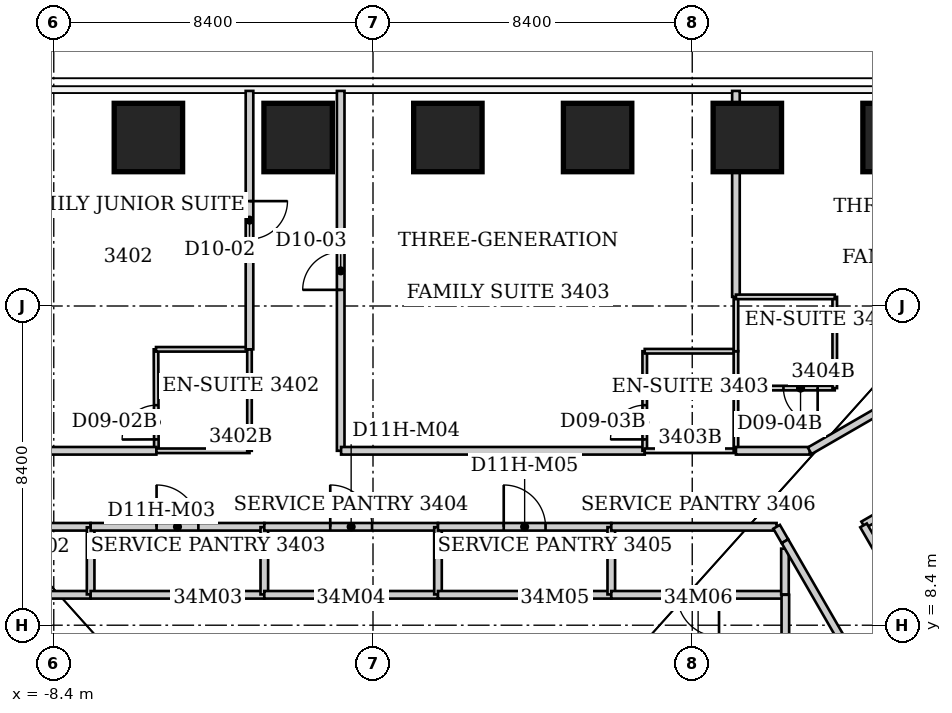
"""IFC4 building model, lengths in metres.
Left out: names, types, materials, properties, quantities, classifications, styles, units other than length and angle.
Written with IfcOpenShell. Run it as: python <this file> out.ifc"""

import sys

from ifc_helpers import new_model, si_unit, direction, frame, frame_2d, origin, origin_2d, place, context, subcontext, project, spatial, rectangle, extrude, element, fill, save


model = new_model("IFC4")
c1 = context("Model", 3, precision=1e-05, world=origin(), true_north=direction((0.0, 1.0)))
c2 = subcontext(c1, "Body", "Model", "MODEL_VIEW")
j1 = project(units=[si_unit("LENGTHUNIT", "METRE"), si_unit("PLANEANGLEUNIT", "RADIAN")], contexts=[c1])
p1 = place(None, origin())
s1 = spatial("IfcSite", under=j1, at=p1, CompositionType="ELEMENT")
p2 = place(p1, origin())
s2 = spatial("IfcBuilding", under=s1, at=p2, CompositionType="ELEMENT")
p3 = place(p2, frame((0.0, 0.0, 138.6)))
s3 = spatial("IfcBuildingStorey", under=s2, at=p3, CompositionType="ELEMENT", Elevation=138.6)
for number, where, z_axis, x_axis in (
    (1, (-5.91, 21.234, 0.0), (0.0, 0.0, 1.0), (0.0, 1.0, 0.0)),
    (2, (-1.97, 21.234, 0.0), (0.0, 0.0, 1.0), (0.0, 1.0, 0.0)),
    (3, (1.97, 21.234, 0.0), (0.0, 0.0, 1.0), (0.0, 1.0, 0.0)),
    (4, (5.91, 21.234, 0.0), (0.0, 0.0, 1.0), (0.0, 1.0, 0.0)),
    (5, (9.85, 21.234, 0.0), (0.0, 0.0, 1.0), (0.0, 1.0, 0.0)),
    (6, (13.79, 21.234, 0.0), (0.0, 0.0, 1.0), (0.0, 1.0, 0.0)),
):
    element("IfcColumn", number, at=place(p3, frame(where, z_axis=z_axis, x_axis=x_axis)), inside=s3, PredefinedType="COLUMN", context=c2, shape_type="SweptSolid", body=[
        extrude(rectangle(XDim=1.8, YDim=1.8, at=origin_2d()), origin(), (0.0, 0.0, 1.0), 3.8),
    ])
p4 = place(p3, frame((-11.99, 10.99, 0.0), z_axis=(0.0, 0.0, 1.0), x_axis=(1.0, 0.0, 0.0)))
e7 = element("IfcWall", 7, at=p4, inside=s3, PredefinedType="PARTITIONING", context=c2, shape_type="SweptSolid", body=[
    extrude(rectangle(XDim=4.56, YDim=0.2, at=frame_2d((2.28, 0.0))), origin(), (0.0, 0.0, 1.0), 3.64),
])
p5 = place(p3, frame((-7.43, 9.2, 0.0), z_axis=(0.0, 0.0, 1.0), x_axis=(-1.0, 0.0, 0.0)))
e8 = element("IfcWall", 8, at=p5, inside=s3, PredefinedType="PARTITIONING", context=c2, shape_type="SweptSolid", body=[
    extrude(rectangle(XDim=3.41, YDim=0.2, at=frame_2d((1.705, 0.0))), origin(), (0.0, 0.0, 1.0), 3.64),
])
p6 = place(p3, frame((-7.43, 10.975, 0.0), z_axis=(0.0, 0.0, 1.0), x_axis=(0.0, -1.0, 0.0)))
e9 = element("IfcWall", 9, at=p6, inside=s3, PredefinedType="PARTITIONING", context=c2, shape_type="SweptSolid", body=[
    extrude(rectangle(XDim=1.765, YDim=0.2, at=frame_2d((0.883, 0.0))), origin(), (0.0, 0.0, 1.0), 3.64),
])
p7 = place(p3, frame((-7.43, 10.99, 0.0), z_axis=(0.0, 0.0, 1.0), x_axis=(1.0, 0.0, 0.0)))
e10 = element("IfcWall", 10, at=p7, inside=s3, PredefinedType="PARTITIONING", context=c2, shape_type="SweptSolid", body=[
    extrude(rectangle(XDim=4.57, YDim=0.2, at=frame_2d((2.285, 0.0))), origin(), (0.0, 0.0, 1.0), 3.64),
])
p8 = place(p7, frame((1.735, 0.0, 0.0)))
e11 = element("IfcOpeningElement", 11, at=p8, cuts=e10, PredefinedType="OPENING", context=c2, shape_type="SweptSolid", body=[
    extrude(rectangle(XDim=1.1, YDim=2.2, at=frame_2d((0.55, 1.1))), frame((0.0, 0.1, 0.0), z_axis=(0.0, -1.0, 0.0), x_axis=(1.0, 0.0, 0.0)), (0.0, 0.0, 1.0), 0.2),
])
p9 = place(p3, frame((-5.71, 15.66, 0.0), z_axis=(0.0, 0.0, 1.0), x_axis=(0.003749059241, -0.999992972253, 0.0)))
e12 = element("IfcWall", 12, at=p9, inside=s3, PredefinedType="PARTITIONING", context=c2, shape_type="SweptSolid", body=[
    extrude(rectangle(XDim=2.67, YDim=0.12, at=frame_2d((1.335, 0.0))), origin(), (0.0, 0.0, 1.0), 3.64),
])
p10 = place(p9, frame((1.47, 0.0, 0.0)))
e13 = element("IfcOpeningElement", 13, at=p10, cuts=e12, PredefinedType="OPENING", context=c2, shape_type="SweptSolid", body=[
    extrude(rectangle(XDim=0.9, YDim=2.03, at=frame_2d((0.45, 1.015))), frame((0.0, 0.06, 0.0), z_axis=(0.0, -1.0, 0.0), x_axis=(1.0, 0.0, 0.0)), (0.0, 0.0, 1.0), 0.12),
])
p11 = place(p3, frame((-5.7, 12.99, 0.0), z_axis=(0.0, 0.0, 1.0), x_axis=(-1.0, 0.0, 0.0)))
e14 = element("IfcWall", 14, at=p11, inside=s3, PredefinedType="PARTITIONING", context=c2, shape_type="SweptSolid", body=[
    extrude(rectangle(XDim=3.92, YDim=0.2, at=frame_2d((1.96, 0.0))), origin(), (0.0, 0.0, 1.0), 3.64),
])
p12 = place(p3, frame((-3.25, 12.99, 0.0), z_axis=(0.0, 0.0, 1.0), x_axis=(-1.0, 0.0, 0.0)))
e15 = element("IfcWall", 15, at=p12, inside=s3, PredefinedType="PARTITIONING", context=c2, shape_type="SweptSolid", body=[
    extrude(rectangle(XDim=2.45, YDim=0.12, at=frame_2d((1.225, 0.0))), origin(), (0.0, 0.0, 1.0), 3.64),
])
p13 = place(p3, frame((-3.25, 15.66, 0.0), z_axis=(0.0, 0.0, 1.0), x_axis=(-1.0, 0.0, 0.0)))
e16 = element("IfcWall", 16, at=p13, inside=s3, PredefinedType="PARTITIONING", context=c2, shape_type="SweptSolid", body=[
    extrude(rectangle(XDim=2.46, YDim=0.12, at=frame_2d((1.23, 0.0))), origin(), (0.0, 0.0, 1.0), 3.64),
])
p14 = place(p3, frame((-3.25, 15.66, 0.0), z_axis=(0.0, 0.0, 1.0), x_axis=(0.0, -1.0, 0.0)))
e17 = element("IfcWall", 17, at=p14, inside=s3, PredefinedType="PARTITIONING", context=c2, shape_type="SweptSolid", body=[
    extrude(rectangle(XDim=2.67, YDim=0.12, at=frame_2d((1.335, 0.0))), origin(), (0.0, 0.0, 1.0), 3.64),
])
p15 = place(p3, frame((-3.25, 22.46, 0.0), z_axis=(0.0, 0.0, 1.0), x_axis=(0.0, -1.0, 0.0)))
e18 = element("IfcWall", 18, at=p15, inside=s3, PredefinedType="PARTITIONING", context=c2, shape_type="SweptSolid", body=[
    extrude(rectangle(XDim=6.8, YDim=0.2, at=frame_2d((3.4, 0.0))), origin(), (0.0, 0.0, 1.0), 3.64),
])
p16 = place(p15, frame((2.9, 0.0, 0.0)))
e19 = element("IfcOpeningElement", 19, at=p16, cuts=e18, PredefinedType="OPENING", context=c2, shape_type="SweptSolid", body=[
    extrude(rectangle(XDim=1.0, YDim=2.13, at=frame_2d((0.5, 1.065))), frame((0.0, 0.1, 0.0), z_axis=(0.0, -1.0, 0.0), x_axis=(1.0, 0.0, 0.0)), (0.0, 0.0, 1.0), 0.2),
])
p17 = place(p3, frame((-2.86, 9.2, 0.0), z_axis=(0.0, 0.0, 1.0), x_axis=(-1.0, 0.0, 0.0)))
e20 = element("IfcWall", 20, at=p17, inside=s3, PredefinedType="PARTITIONING", context=c2, shape_type="SweptSolid", body=[
    extrude(rectangle(XDim=4.57, YDim=0.2, at=frame_2d((2.285, 0.0))), origin(), (0.0, 0.0, 1.0), 3.64),
])
p18 = place(p3, frame((-2.86, 10.98, 0.0), z_axis=(0.0, 0.0, 1.0), x_axis=(0.0, -1.0, 0.0)))
e21 = element("IfcWall", 21, at=p18, inside=s3, PredefinedType="PARTITIONING", context=c2, shape_type="SweptSolid", body=[
    extrude(rectangle(XDim=1.77, YDim=0.2, at=frame_2d((0.885, 0.0))), origin(), (0.0, 0.0, 1.0), 3.64),
])
p19 = place(p3, frame((-2.86, 10.99, 0.0), z_axis=(0.0, 0.0, 1.0), x_axis=(1.0, 0.0, 0.0)))
e22 = element("IfcWall", 22, at=p19, inside=s3, PredefinedType="PARTITIONING", context=c2, shape_type="SweptSolid", body=[
    extrude(rectangle(XDim=4.57, YDim=0.2, at=frame_2d((2.285, 0.0))), origin(), (0.0, 0.0, 1.0), 3.64),
])
p20 = place(p19, frame((1.735, 0.0, 0.0)))
e23 = element("IfcOpeningElement", 23, at=p20, cuts=e22, PredefinedType="OPENING", context=c2, shape_type="SweptSolid", body=[
    extrude(rectangle(XDim=1.1, YDim=2.2, at=frame_2d((0.55, 1.1))), frame((0.0, 0.1, 0.0), z_axis=(0.0, -1.0, 0.0), x_axis=(1.0, 0.0, 0.0)), (0.0, 0.0, 1.0), 0.2),
])
p21 = place(p3, frame((-0.85, 12.99, 0.0), z_axis=(0.0, 0.0, 1.0), x_axis=(0.0, 1.0, 0.0)))
e24 = element("IfcWall", 24, at=p21, inside=s3, PredefinedType="PARTITIONING", context=c2, shape_type="SweptSolid", body=[
    extrude(rectangle(XDim=9.47, YDim=0.2, at=frame_2d((4.735, 0.0))), origin(), (0.0, 0.0, 1.0), 3.64),
])
p22 = place(p21, frame((4.235, 0.0, 0.0)))
e25 = element("IfcOpeningElement", 25, at=p22, cuts=e24, PredefinedType="OPENING", context=c2, shape_type="SweptSolid", body=[
    extrude(rectangle(XDim=1.0, YDim=2.13, at=frame_2d((0.5, 1.065))), frame((0.0, 0.1, 0.0), z_axis=(0.0, -1.0, 0.0), x_axis=(1.0, 0.0, 0.0)), (0.0, 0.0, 1.0), 0.2),
])
p23 = place(p3, frame((1.71, 9.2, 0.0), z_axis=(0.0, 0.0, 1.0), x_axis=(-1.0, 0.0, 0.0)))
e26 = element("IfcWall", 26, at=p23, inside=s3, PredefinedType="PARTITIONING", context=c2, shape_type="SweptSolid", body=[
    extrude(rectangle(XDim=4.57, YDim=0.2, at=frame_2d((2.285, 0.0))), origin(), (0.0, 0.0, 1.0), 3.64),
])
p24 = place(p3, frame((1.71, 10.98, 0.0), z_axis=(0.0, 0.0, 1.0), x_axis=(0.0, -1.0, 0.0)))
e27 = element("IfcWall", 27, at=p24, inside=s3, PredefinedType="PARTITIONING", context=c2, shape_type="SweptSolid", body=[
    extrude(rectangle(XDim=1.77, YDim=0.2, at=frame_2d((0.885, 0.0))), origin(), (0.0, 0.0, 1.0), 3.64),
])
p25 = place(p3, frame((1.71, 10.99, 0.0), z_axis=(0.0, 0.0, 1.0), x_axis=(1.0, 0.0, 0.0)))
e28 = element("IfcWall", 28, at=p25, inside=s3, PredefinedType="PARTITIONING", context=c2, shape_type="SweptSolid", body=[
    extrude(rectangle(XDim=4.56, YDim=0.2, at=frame_2d((2.28, 0.0))), origin(), (0.0, 0.0, 1.0), 3.64),
])
p26 = place(p25, frame((1.73, 0.0, 0.0)))
e29 = element("IfcOpeningElement", 29, at=p26, cuts=e28, PredefinedType="OPENING", context=c2, shape_type="SweptSolid", body=[
    extrude(rectangle(XDim=1.1, YDim=2.2, at=frame_2d((0.55, 1.1))), frame((0.0, 0.1, 0.0), z_axis=(0.0, -1.0, 0.0), x_axis=(1.0, 0.0, 0.0)), (0.0, 0.0, 1.0), 0.2),
])
p27 = place(p3, frame((6.27, 9.2, 0.0), z_axis=(0.0, 0.0, 1.0), x_axis=(-1.0, 0.0, 0.0)))
e30 = element("IfcWall", 30, at=p27, inside=s3, PredefinedType="PARTITIONING", context=c2, shape_type="SweptSolid", body=[
    extrude(rectangle(XDim=4.56, YDim=0.2, at=frame_2d((2.28, 0.0))), origin(), (0.0, 0.0, 1.0), 3.64),
])
p28 = place(p3, frame((6.27, 10.98, 0.0), z_axis=(0.0, 0.0, 1.0), x_axis=(0.0, -1.0, 0.0)))
e31 = element("IfcWall", 31, at=p28, inside=s3, PredefinedType="PARTITIONING", context=c2, shape_type="SweptSolid", body=[
    extrude(rectangle(XDim=1.77, YDim=0.2, at=frame_2d((0.885, 0.0))), origin(), (0.0, 0.0, 1.0), 3.64),
])
p29 = place(p3, frame((6.27, 10.99, 0.0), z_axis=(0.0, 0.0, 1.0), x_axis=(1.0, 0.0, 0.0)))
e32 = element("IfcWall", 32, at=p29, inside=s3, PredefinedType="PARTITIONING", context=c2, shape_type="SweptSolid", body=[
    extrude(rectangle(XDim=4.35, YDim=0.2, at=frame_2d((2.175, 0.0))), origin(), (0.0, 0.0, 1.0), 3.64),
])
p30 = place(p3, frame((7.15, 12.99, 0.0), z_axis=(0.0, 0.0, 1.0), x_axis=(-1.0, 0.0, 0.0)))
e33 = element("IfcWall", 33, at=p30, inside=s3, PredefinedType="PARTITIONING", context=c2, shape_type="SweptSolid", body=[
    extrude(rectangle(XDim=7.99, YDim=0.2, at=frame_2d((3.995, 0.0))), origin(), (0.0, 0.0, 1.0), 3.64),
])
p31 = place(p3, frame((7.15, 15.61, 0.0), z_axis=(0.0, 0.0, 1.0), x_axis=(0.0, -1.0, 0.0)))
e34 = element("IfcWall", 34, at=p31, inside=s3, PredefinedType="PARTITIONING", context=c2, shape_type="SweptSolid", body=[
    extrude(rectangle(XDim=2.62, YDim=0.12, at=frame_2d((1.31, 0.0))), origin(), (0.0, 0.0, 1.0), 3.64),
])
p32 = place(p31, frame((1.42, 0.0, 0.0)))
e35 = element("IfcOpeningElement", 35, at=p32, cuts=e34, PredefinedType="OPENING", context=c2, shape_type="SweptSolid", body=[
    extrude(rectangle(XDim=0.9, YDim=2.03, at=frame_2d((0.45, 1.015))), frame((0.0, 0.06, 0.0), z_axis=(0.0, -1.0, 0.0), x_axis=(1.0, 0.0, 0.0)), (0.0, 0.0, 1.0), 0.12),
])
p33 = place(p3, frame((9.55, 12.99, 0.0), z_axis=(0.0, 0.0, 1.0), x_axis=(-1.0, 0.0, 0.0)))
e36 = element("IfcWall", 36, at=p33, inside=s3, PredefinedType="PARTITIONING", context=c2, shape_type="SweptSolid", body=[
    extrude(rectangle(XDim=2.4, YDim=0.12, at=frame_2d((1.2, 0.0))), origin(), (0.0, 0.0, 1.0), 3.64),
])
p34 = place(p3, frame((9.55, 14.64, 0.0), z_axis=(0.0, 0.0, 1.0), x_axis=(0.0, -1.0, 0.0)))
e37 = element("IfcWall", 37, at=p34, inside=s3, PredefinedType="PARTITIONING", context=c2, shape_type="SweptSolid", body=[
    extrude(rectangle(XDim=1.65, YDim=0.12, at=frame_2d((0.825, 0.0))), origin(), (0.0, 0.0, 1.0), 3.64),
])
p35 = place(p3, frame((9.55, 14.64, 0.0), z_axis=(0.0, 0.0, 1.0), x_axis=(1.0, 0.0, 0.0)))
e38 = element("IfcWall", 38, at=p35, inside=s3, PredefinedType="PARTITIONING", context=c2, shape_type="SweptSolid", body=[
    extrude(rectangle(XDim=2.6, YDim=0.12, at=frame_2d((1.3, 0.0))), origin(), (0.0, 0.0, 1.0), 3.64),
])
p36 = place(p35, frame((1.25, 0.0, 0.0)))
e39 = element("IfcOpeningElement", 39, at=p36, cuts=e38, PredefinedType="OPENING", context=c2, shape_type="SweptSolid", body=[
    extrude(rectangle(XDim=0.9, YDim=2.03, at=frame_2d((0.45, 1.015))), frame((0.0, 0.06, 0.0), z_axis=(0.0, -1.0, 0.0), x_axis=(1.0, 0.0, 0.0)), (0.0, 0.0, 1.0), 0.12),
])
p37 = place(p3, frame((9.55, 15.61, 0.0), z_axis=(0.0, 0.0, 1.0), x_axis=(-1.0, 0.0, 0.0)))
e40 = element("IfcWall", 40, at=p37, inside=s3, PredefinedType="PARTITIONING", context=c2, shape_type="SweptSolid", body=[
    extrude(rectangle(XDim=2.4, YDim=0.12, at=frame_2d((1.2, 0.0))), origin(), (0.0, 0.0, 1.0), 3.64),
])
p38 = place(p3, frame((9.55, 15.61, 0.0), z_axis=(0.0, 0.0, 1.0), x_axis=(0.0, -1.0, 0.0)))
e41 = element("IfcWall", 41, at=p38, inside=s3, PredefinedType="PARTITIONING", context=c2, shape_type="SweptSolid", body=[
    extrude(rectangle(XDim=0.97, YDim=0.12, at=frame_2d((0.485, 0.0))), origin(), (0.0, 0.0, 1.0), 3.64),
])
p39 = place(p3, frame((9.55, 17.04, 0.0), z_axis=(0.0, 0.0, 1.0), x_axis=(0.0, -1.0, 0.0)))
e42 = element("IfcWall", 42, at=p39, inside=s3, PredefinedType="PARTITIONING", context=c2, shape_type="SweptSolid", body=[
    extrude(rectangle(XDim=1.43, YDim=0.12, at=frame_2d((0.715, 0.0))), origin(), (0.0, 0.0, 1.0), 3.64),
])
p40 = place(p3, frame((9.55, 22.46, 0.0), z_axis=(0.0, 0.0, 1.0), x_axis=(0.0, -1.0, 0.0)))
e43 = element("IfcWall", 43, at=p40, inside=s3, PredefinedType="PARTITIONING", context=c2, shape_type="SweptSolid", body=[
    extrude(rectangle(XDim=5.42, YDim=0.2, at=frame_2d((2.71, 0.0))), origin(), (0.0, 0.0, 1.0), 3.64),
])
p41 = place(p3, frame((10.62, 10.99, 0.0), z_axis=(0.0, 0.0, 1.0), x_axis=(0.5011020393, -0.865388205495, 0.0)))
e44 = element("IfcWall", 44, at=p41, inside=s3, PredefinedType="PARTITIONING", context=c2, shape_type="SweptSolid", body=[
    extrude(rectangle(XDim=0.439, YDim=0.2, at=frame_2d((0.219, 0.0))), origin(), (0.0, 0.0, 1.0), 3.64),
])
p42 = place(p3, frame((10.84, 9.2, 0.0), z_axis=(0.0, 0.0, 1.0), x_axis=(-1.0, 0.0, 0.0)))
e45 = element("IfcWall", 45, at=p42, inside=s3, PredefinedType="PARTITIONING", context=c2, shape_type="SweptSolid", body=[
    extrude(rectangle(XDim=4.57, YDim=0.2, at=frame_2d((2.285, 0.0))), origin(), (0.0, 0.0, 1.0), 3.64),
])
p43 = place(p42, frame((1.735, 0.0, 0.0)))
e46 = element("IfcOpeningElement", 46, at=p43, cuts=e45, PredefinedType="OPENING", context=c2, shape_type="SweptSolid", body=[
    extrude(rectangle(XDim=1.1, YDim=2.2, at=frame_2d((0.55, 1.1))), frame((0.0, 0.1, 0.0), z_axis=(0.0, -1.0, 0.0), x_axis=(1.0, 0.0, 0.0)), (0.0, 0.0, 1.0), 0.2),
])
p44 = place(p3, frame((10.84, 10.415, 0.0), z_axis=(0.0, 0.0, 1.0), x_axis=(0.0, -1.0, 0.0)))
e47 = element("IfcWall", 47, at=p44, inside=s3, PredefinedType="PARTITIONING", context=c2, shape_type="SweptSolid", body=[
    extrude(rectangle(XDim=1.205, YDim=0.2, at=frame_2d((0.603, 0.0))), origin(), (0.0, 0.0, 1.0), 3.64),
])
p45 = place(p3, frame((10.84, 10.61, 0.0), z_axis=(0.0, 0.0, 1.0), x_axis=(0.500237524763, -0.865888225361, 0.0)))
e48 = element("IfcWall", 48, at=p45, inside=s3, PredefinedType="PARTITIONING", context=c2, shape_type="SweptSolid", body=[
    extrude(rectangle(XDim=9.135, YDim=0.2, at=frame_2d((4.568, 0.0))), origin(), (0.0, 0.0, 1.0), 3.64),
])
p46 = place(p3, frame((10.85, -5.19, 0.0), z_axis=(0.0, 0.0, 1.0), x_axis=(0.0, 1.0, 0.0)))
e49 = element("IfcWall", 49, at=p46, inside=s3, PredefinedType="PARTITIONING", context=c2, shape_type="SweptSolid", body=[
    extrude(rectangle(XDim=14.39, YDim=0.2, at=frame_2d((7.195, 0.0))), origin(), (0.0, 0.0, 1.0), 3.64),
])
p47 = place(p46, frame((6.645, 0.0, 0.0)))
e50 = element("IfcOpeningElement", 50, at=p47, cuts=e49, PredefinedType="OPENING", context=c2, shape_type="SweptSolid", body=[
    extrude(rectangle(XDim=1.1, YDim=2.2, at=frame_2d((0.55, 1.1))), frame((0.0, 0.1, 0.0), z_axis=(0.0, -1.0, 0.0), x_axis=(1.0, 0.0, 0.0)), (0.0, 0.0, 1.0), 0.2),
])
p48 = place(p3, frame((11.49, 12.99, 0.0), z_axis=(0.0, 0.0, 1.0), x_axis=(-1.0, 0.0, 0.0)))
e51 = element("IfcWall", 51, at=p48, inside=s3, PredefinedType="PARTITIONING", context=c2, shape_type="SweptSolid", body=[
    extrude(rectangle(XDim=1.94, YDim=0.2, at=frame_2d((0.97, 0.0))), origin(), (0.0, 0.0, 1.0), 3.64),
])
p49 = place(p3, frame((12.15, 14.64, 0.0), z_axis=(0.0, 0.0, 1.0), x_axis=(0.0, 1.0, 0.0)))
e52 = element("IfcWall", 52, at=p49, inside=s3, PredefinedType="PARTITIONING", context=c2, shape_type="SweptSolid", body=[
    extrude(rectangle(XDim=2.4, YDim=0.12, at=frame_2d((1.2, 0.0))), origin(), (0.0, 0.0, 1.0), 3.64),
])
p50 = place(p3, frame((12.15, 17.04, 0.0), z_axis=(0.0, 0.0, 1.0), x_axis=(-1.0, 0.0, 0.0)))
e53 = element("IfcWall", 53, at=p50, inside=s3, PredefinedType="PARTITIONING", context=c2, shape_type="SweptSolid", body=[
    extrude(rectangle(XDim=2.6, YDim=0.12, at=frame_2d((1.3, 0.0))), origin(), (0.0, 0.0, 1.0), 3.64),
])
p51 = place(p3, frame((12.9, 11.04, 0.0), z_axis=(0.0, 0.0, 1.0), x_axis=(0.866295705695, 0.499531530832, 0.0)))
e54 = element("IfcWall", 54, at=p51, inside=s3, PredefinedType="PARTITIONING", context=c2, shape_type="SweptSolid", body=[
    extrude(rectangle(XDim=9.189, YDim=0.2, at=frame_2d((4.594, 0.0))), origin(), (0.0, 0.0, 1.0), 3.64),
])
p52 = place(p51, frame((4.094, 0.0, 0.0)))
e55 = element("IfcOpeningElement", 55, at=p52, cuts=e54, PredefinedType="OPENING", context=c2, shape_type="SweptSolid", body=[
    extrude(rectangle(XDim=1.0, YDim=2.13, at=frame_2d((0.5, 1.065))), frame((0.0, 0.1, 0.0), z_axis=(0.0, -1.0, 0.0), x_axis=(1.0, 0.0, 0.0)), (0.0, 0.0, 1.0), 0.2),
])
p53 = place(p3, frame((12.907, 11.027, 0.0), z_axis=(0.0, 0.0, 1.0), x_axis=(0.499726078095, -0.86618349492, 0.0)))
e56 = element("IfcWall", 56, at=p53, inside=s3, PredefinedType="PARTITIONING", context=c2, shape_type="SweptSolid", body=[
    extrude(rectangle(XDim=3.887, YDim=0.2, at=frame_2d((1.944, 0.0))), origin(), (0.0, 0.0, 1.0), 3.64),
])
p54 = place(p3, frame((19.66, 17.71, 0.0), z_axis=(0.0, 0.0, 1.0), x_axis=(-0.865884749539, -0.500243541204, 0.0)))
e57 = element("IfcWall", 57, at=p54, inside=s3, PredefinedType="PARTITIONING", context=c2, shape_type="SweptSolid", body=[
    extrude(rectangle(XDim=9.435, YDim=0.2, at=frame_2d((4.718, 0.0))), origin(), (0.0, 0.0, 1.0), 3.64),
])
p55 = place(p54, frame((4.218, 0.0, 0.0)))
e58 = element("IfcOpeningElement", 58, at=p55, cuts=e57, PredefinedType="OPENING", context=c2, shape_type="SweptSolid", body=[
    extrude(rectangle(XDim=1.0, YDim=2.13, at=frame_2d((0.5, 1.065))), frame((0.0, 0.1, 0.0), z_axis=(0.0, -1.0, 0.0), x_axis=(1.0, 0.0, 0.0)), (0.0, 0.0, 1.0), 0.2),
])
p56 = place(p16, origin())
e59 = element("IfcDoor", 59, at=p56, inside=s3, OperationType="SINGLE_SWING_LEFT", PredefinedType="DOOR", context=c2, shape_type="SweptSolid", body=[
    extrude(rectangle(XDim=1.0, YDim=2.13, at=frame_2d((0.5, 1.065))), frame((0.0, 0.025, 0.0), z_axis=(0.0, -1.0, 0.0), x_axis=(1.0, 0.0, 0.0)), (0.0, 0.0, 1.0), 0.05),
])
fill(e19, e59)
p57 = place(p10, origin())
e60 = element("IfcDoor", 60, at=p57, inside=s3, OperationType="SINGLE_SWING_RIGHT", PredefinedType="DOOR", context=c2, shape_type="SweptSolid", body=[
    extrude(rectangle(XDim=0.9, YDim=2.03, at=frame_2d((0.45, 1.015))), frame((0.0, 0.025, 0.0), z_axis=(0.0, -1.0, 0.0), x_axis=(1.0, 0.0, 0.0)), (0.0, 0.0, 1.0), 0.05),
])
fill(e13, e60)
p58 = place(p22, origin())
e61 = element("IfcDoor", 61, at=p58, inside=s3, OperationType="SINGLE_SWING_LEFT", PredefinedType="DOOR", context=c2, shape_type="SweptSolid", body=[
    extrude(rectangle(XDim=1.0, YDim=2.13, at=frame_2d((0.5, 1.065))), frame((0.0, 0.025, 0.0), z_axis=(0.0, -1.0, 0.0), x_axis=(1.0, 0.0, 0.0)), (0.0, 0.0, 1.0), 0.05),
])
fill(e25, e61)
p59 = place(p32, origin())
e62 = element("IfcDoor", 62, at=p59, inside=s3, OperationType="SINGLE_SWING_RIGHT", PredefinedType="DOOR", context=c2, shape_type="SweptSolid", body=[
    extrude(rectangle(XDim=0.9, YDim=2.03, at=frame_2d((0.45, 1.015))), frame((0.0, 0.025, 0.0), z_axis=(0.0, -1.0, 0.0), x_axis=(1.0, 0.0, 0.0)), (0.0, 0.0, 1.0), 0.05),
])
fill(e35, e62)
p60 = place(p36, origin())
e63 = element("IfcDoor", 63, at=p60, inside=s3, OperationType="SINGLE_SWING_RIGHT", PredefinedType="DOOR", context=c2, shape_type="SweptSolid", body=[
    extrude(rectangle(XDim=0.9, YDim=2.03, at=frame_2d((0.45, 1.015))), frame((0.0, 0.025, 0.0), z_axis=(0.0, -1.0, 0.0), x_axis=(1.0, 0.0, 0.0)), (0.0, 0.0, 1.0), 0.05),
])
fill(e39, e63)
p61 = place(p8, origin())
e64 = element("IfcDoor", 64, at=p61, inside=s3, OperationType="SINGLE_SWING_LEFT", PredefinedType="DOOR", context=c2, shape_type="SweptSolid", body=[
    extrude(rectangle(XDim=1.1, YDim=2.2, at=frame_2d((0.55, 1.1))), frame((0.0, 0.025, 0.0), z_axis=(0.0, -1.0, 0.0), x_axis=(1.0, 0.0, 0.0)), (0.0, 0.0, 1.0), 0.05),
])
fill(e11, e64)
p62 = place(p20, origin())
e65 = element("IfcDoor", 65, at=p62, inside=s3, OperationType="SINGLE_SWING_LEFT", PredefinedType="DOOR", context=c2, shape_type="SweptSolid", body=[
    extrude(rectangle(XDim=1.1, YDim=2.2, at=frame_2d((0.55, 1.1))), frame((0.0, 0.025, 0.0), z_axis=(0.0, -1.0, 0.0), x_axis=(1.0, 0.0, 0.0)), (0.0, 0.0, 1.0), 0.05),
])
fill(e23, e65)
p63 = place(p26, origin())
e66 = element("IfcDoor", 66, at=p63, inside=s3, OperationType="SINGLE_SWING_LEFT", PredefinedType="DOOR", context=c2, shape_type="SweptSolid", body=[
    extrude(rectangle(XDim=1.1, YDim=2.2, at=frame_2d((0.55, 1.1))), frame((0.0, 0.025, 0.0), z_axis=(0.0, -1.0, 0.0), x_axis=(1.0, 0.0, 0.0)), (0.0, 0.0, 1.0), 0.05),
])
fill(e29, e66)
p64 = place(p43, origin())
e67 = element("IfcDoor", 67, at=p64, inside=s3, OperationType="SINGLE_SWING_LEFT", PredefinedType="DOOR", context=c2, shape_type="SweptSolid", body=[
    extrude(rectangle(XDim=1.1, YDim=2.2, at=frame_2d((0.55, 1.1))), frame((0.0, 0.025, 0.0), z_axis=(0.0, -1.0, 0.0), x_axis=(1.0, 0.0, 0.0)), (0.0, 0.0, 1.0), 0.05),
])
fill(e46, e67)
save(model, sys.argv[1])
